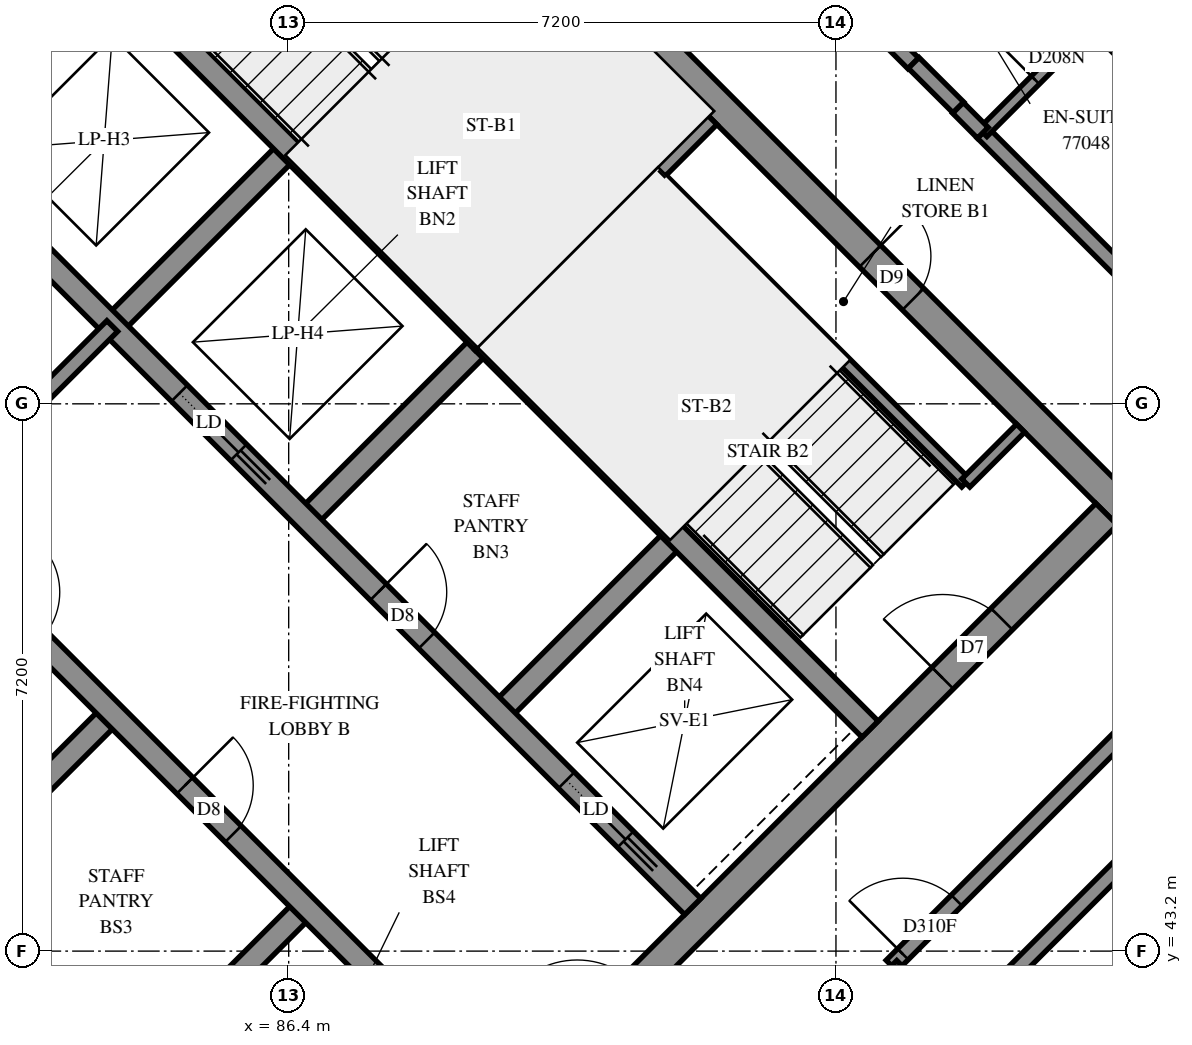
"""IFC4 building model, lengths in metres.
Left out: names, types, materials, properties, quantities, classifications, styles, units other than length and angle.
Written with IfcOpenShell. Run it as: python <this file> out.ifc"""

import sys

from ifc_helpers import new_model, si_unit, direction, frame, frame_2d, origin, place, context, subcontext, project, spatial, polyline, rectangle, outline, extrude, element, fill, save


model = new_model("IFC4")
c1 = context("Model", 3, precision=1e-05, world=origin(), true_north=direction((0.0, 1.0)))
c2 = subcontext(c1, "Body", "Model", "MODEL_VIEW")
j1 = project(units=[si_unit("LENGTHUNIT", "METRE"), si_unit("PLANEANGLEUNIT", "RADIAN")], contexts=[c1])
p1 = place(None, origin())
s1 = spatial("IfcSite", under=j1, at=p1, CompositionType="ELEMENT")
p2 = place(p1, origin())
s2 = spatial("IfcBuilding", under=s1, at=p2, CompositionType="ELEMENT")
p3 = place(p2, frame((0.0, 0.0, 281.2)))
s3 = spatial("IfcBuildingStorey", under=s2, at=p3, CompositionType="ELEMENT", Elevation=281.2)
p4 = place(p3, frame((76.23, 49.231, -0.3), z_axis=(0.0, 0.0, 1.0), x_axis=(0.7071034917, -0.7071100706, 0.0)))
e1 = element("IfcWall", 1, at=p4, inside=s3, PredefinedType="SHEAR", context=c2, shape_type="SweptSolid", body=[
    extrude(rectangle(XDim=15.2, YDim=0.4, at=frame_2d((7.6, 0.0))), origin(), (0.0, 0.0, 1.0), 2.7),
])
p5 = place(p3, frame((86.695, 59.696, -0.3), z_axis=(0.0, 0.0, 1.0), x_axis=(0.7071100706, -0.7071034917, 0.0)))
e2 = element("IfcWall", 2, at=p5, inside=s3, PredefinedType="SHEAR", context=c2, shape_type="SweptSolid", body=[
    extrude(rectangle(XDim=15.2, YDim=0.4, at=frame_2d((7.6, 0.0))), origin(), (0.0, 0.0, 1.0), 2.7),
])
p6 = place(p5, frame((10.4, 0.0, 0.3)))
e3 = element("IfcOpeningElement", 3, at=p6, cuts=e2, PredefinedType="OPENING", context=c2, shape_type="SweptSolid", body=[
    extrude(rectangle(XDim=0.8, YDim=2.1, at=frame_2d((0.4, 1.05))), frame((0.0, 0.21, 0.0), z_axis=(0.0, -1.0, 0.0), x_axis=(1.0, 0.0, 0.0)), (0.0, 0.0, 1.0), 0.42),
])
p7 = place(p3, frame((76.513, 49.231, -0.3), z_axis=(0.0, 0.0, 1.0), x_axis=(0.7071067812, 0.7071067812, 0.0)))
e4 = element("IfcWall", 4, at=p7, inside=s3, PredefinedType="SHEAR", context=c2, shape_type="SweptSolid", body=[
    extrude(rectangle(XDim=14.4, YDim=0.4, at=frame_2d((7.2, 0.0))), origin(), (0.0, 0.0, 1.0), 2.7),
])
p8 = place(p7, frame((4.55, 0.0, 0.3)))
e5 = element("IfcOpeningElement", 5, at=p8, cuts=e4, PredefinedType="OPENING", context=c2, shape_type="SweptSolid", body=[
    extrude(rectangle(XDim=1.1, YDim=2.1, at=frame_2d((0.55, 1.05))), frame((0.0, 0.21, 0.0), z_axis=(0.0, -1.0, 0.0), x_axis=(1.0, 0.0, 0.0)), (0.0, 0.0, 1.0), 0.42),
])
p9 = place(p7, frame((11.35, 0.0, 0.3)))
e6 = element("IfcOpeningElement", 6, at=p9, cuts=e4, PredefinedType="OPENING", context=c2, shape_type="SweptSolid", body=[
    extrude(rectangle(XDim=1.1, YDim=2.1, at=frame_2d((0.55, 1.05))), frame((0.0, 0.21, 0.0), z_axis=(0.0, -1.0, 0.0), x_axis=(1.0, 0.0, 0.0)), (0.0, 0.0, 1.0), 0.42),
])
p10 = place(p3, frame((86.978, 38.766, -0.3), z_axis=(0.0, 0.0, 1.0), x_axis=(0.7071067812, 0.7071067812, 0.0)))
e7 = element("IfcWall", 7, at=p10, inside=s3, PredefinedType="SHEAR", context=c2, shape_type="SweptSolid", body=[
    extrude(rectangle(XDim=14.4, YDim=0.4, at=frame_2d((7.2, 0.0))), origin(), (0.0, 0.0, 1.0), 2.7),
])
p11 = place(p10, frame((4.55, 0.0, 0.3)))
e8 = element("IfcOpeningElement", 8, at=p11, cuts=e7, PredefinedType="OPENING", context=c2, shape_type="SweptSolid", body=[
    extrude(rectangle(XDim=1.1, YDim=2.1, at=frame_2d((0.55, 1.05))), frame((0.0, 0.21, 0.0), z_axis=(0.0, -1.0, 0.0), x_axis=(1.0, 0.0, 0.0)), (0.0, 0.0, 1.0), 0.42),
])
p12 = place(p10, frame((11.35, 0.0, 0.3)))
e9 = element("IfcOpeningElement", 9, at=p12, cuts=e7, PredefinedType="OPENING", context=c2, shape_type="SweptSolid", body=[
    extrude(rectangle(XDim=1.1, YDim=2.1, at=frame_2d((0.55, 1.05))), frame((0.0, 0.21, 0.0), z_axis=(0.0, -1.0, 0.0), x_axis=(1.0, 0.0, 0.0)), (0.0, 0.0, 1.0), 0.42),
])
p13 = place(p3, frame((84.079, 51.423, 0.0), z_axis=(0.0, 0.0, 1.0), x_axis=(0.7071219326, 0.7070916295, 0.0)))
e10 = element("IfcWall", 10, at=p13, inside=s3, PredefinedType="SOLIDWALL", context=c2, shape_type="SweptSolid", body=[
    extrude(rectangle(XDim=3.3, YDim=0.3, at=frame_2d((1.65, 0.0))), origin(), (0.0, 0.0, 1.0), 3.1),
])
p14 = place(p3, frame((81.746, 43.999, 0.0), z_axis=(0.0, 0.0, 1.0), x_axis=(0.7071067812, 0.7071067812, 0.0)))
e11 = element("IfcWall", 11, at=p14, inside=s3, PredefinedType="SOLIDWALL", context=c2, shape_type="SweptSolid", body=[
    extrude(rectangle(XDim=3.3, YDim=0.3, at=frame_2d((1.65, 0.0))), origin(), (0.0, 0.0, 1.0), 3.1),
])
p15 = place(p3, frame((86.625, 48.878, 0.0), z_axis=(0.0, 0.0, 1.0), x_axis=(0.7071067812, 0.7071067812, 0.0)))
e12 = element("IfcWall", 12, at=p15, inside=s3, PredefinedType="SOLIDWALL", context=c2, shape_type="SweptSolid", body=[
    extrude(rectangle(XDim=3.3, YDim=0.3, at=frame_2d((1.65, 0.0))), origin(), (0.0, 0.0, 1.0), 3.1),
])
p16 = place(p3, frame((84.291, 41.453, 0.0), z_axis=(0.0, 0.0, 1.0), x_axis=(0.7071067812, 0.7071067812, 0.0)))
e13 = element("IfcWall", 13, at=p16, inside=s3, PredefinedType="SOLIDWALL", context=c2, shape_type="SweptSolid", body=[
    extrude(rectangle(XDim=3.3, YDim=0.3, at=frame_2d((1.65, 0.0))), origin(), (0.0, 0.0, 1.0), 3.1),
])
p17 = place(p3, frame((89.17, 46.332, 0.0), z_axis=(0.0, 0.0, 1.0), x_axis=(0.7071067812, 0.7071067812, 0.0)))
e14 = element("IfcWall", 14, at=p17, inside=s3, PredefinedType="SOLIDWALL", context=c2, shape_type="SweptSolid", body=[
    extrude(rectangle(XDim=3.3, YDim=0.3, at=frame_2d((1.65, 0.0))), origin(), (0.0, 0.0, 1.0), 3.1),
])
p18 = place(p3, frame((78.988, 51.423, 0.0), z_axis=(0.0, 0.0, 1.0), x_axis=(0.7071067812, -0.7071067812, 0.0)))
e15 = element("IfcWall", 15, at=p18, inside=s3, PredefinedType="SOLIDWALL", context=c2, shape_type="SweptSolid", body=[
    extrude(rectangle(XDim=14.4, YDim=0.3, at=frame_2d((7.2, 0.0))), origin(), (0.0, 0.0, 1.0), 3.1),
])
p19 = place(p18, frame((1.35, 0.0, 0.0)))
e16 = element("IfcOpeningElement", 16, at=p19, cuts=e15, PredefinedType="OPENING", context=c2, shape_type="SweptSolid", body=[
    extrude(rectangle(XDim=0.9, YDim=2.1, at=frame_2d((0.45, 1.05))), frame((0.0, 0.16, 0.0), z_axis=(0.0, -1.0, 0.0), x_axis=(1.0, 0.0, 0.0)), (0.0, 0.0, 1.0), 0.32),
])
p20 = place(p18, frame((4.95, 0.0, 0.0)))
e17 = element("IfcOpeningElement", 17, at=p20, cuts=e15, PredefinedType="OPENING", context=c2, shape_type="SweptSolid", body=[
    extrude(rectangle(XDim=0.9, YDim=2.1, at=frame_2d((0.45, 1.05))), frame((0.0, 0.16, 0.0), z_axis=(0.0, -1.0, 0.0), x_axis=(1.0, 0.0, 0.0)), (0.0, 0.0, 1.0), 0.32),
])
p21 = place(p18, frame((8.55, 0.0, 0.0)))
e18 = element("IfcOpeningElement", 18, at=p21, cuts=e15, PredefinedType="OPENING", context=c2, shape_type="SweptSolid", body=[
    extrude(rectangle(XDim=0.9, YDim=2.1, at=frame_2d((0.45, 1.05))), frame((0.0, 0.16, 0.0), z_axis=(0.0, -1.0, 0.0), x_axis=(1.0, 0.0, 0.0)), (0.0, 0.0, 1.0), 0.32),
])
p22 = place(p18, frame((12.05, 0.0, 0.0)))
e19 = element("IfcOpeningElement", 19, at=p22, cuts=e15, PredefinedType="OPENING", context=c2, shape_type="SweptSolid", body=[
    extrude(rectangle(XDim=1.1, YDim=2.1, at=frame_2d((0.55, 1.05))), frame((0.0, 0.16, 0.0), z_axis=(0.0, -1.0, 0.0), x_axis=(1.0, 0.0, 0.0)), (0.0, 0.0, 1.0), 0.32),
])
p23 = place(p3, frame((81.534, 53.969, 0.0), z_axis=(0.0, 0.0, 1.0), x_axis=(0.707103309, -0.7071102534, 0.0)))
e20 = element("IfcWall", 20, at=p23, inside=s3, PredefinedType="SOLIDWALL", context=c2, shape_type="SweptSolid", body=[
    extrude(rectangle(XDim=14.4, YDim=0.3, at=frame_2d((7.2, 0.0))), origin(), (0.0, 0.0, 1.0), 3.1),
])
p24 = place(p23, frame((8.55, 0.0, 0.0)))
e21 = element("IfcOpeningElement", 21, at=p24, cuts=e20, PredefinedType="OPENING", context=c2, shape_type="SweptSolid", body=[
    extrude(rectangle(XDim=0.9, YDim=2.1, at=frame_2d((0.45, 1.05))), frame((0.0, 0.16, 0.0), z_axis=(0.0, -1.0, 0.0), x_axis=(1.0, 0.0, 0.0)), (0.0, 0.0, 1.0), 0.32),
])
p25 = place(p23, frame((1.25, 0.0, 0.0)))
e22 = element("IfcOpeningElement", 22, at=p25, cuts=e20, PredefinedType="OPENING", context=c2, shape_type="SweptSolid", body=[
    extrude(rectangle(XDim=1.1, YDim=2.1, at=frame_2d((0.55, 1.05))), frame((0.0, 0.16, 0.0), z_axis=(0.0, -1.0, 0.0), x_axis=(1.0, 0.0, 0.0)), (0.0, 0.0, 1.0), 0.32),
])
p26 = place(p23, frame((4.85, 0.0, 0.0)))
e23 = element("IfcOpeningElement", 23, at=p26, cuts=e20, PredefinedType="OPENING", context=c2, shape_type="SweptSolid", body=[
    extrude(rectangle(XDim=1.1, YDim=2.1, at=frame_2d((0.55, 1.05))), frame((0.0, 0.16, 0.0), z_axis=(0.0, -1.0, 0.0), x_axis=(1.0, 0.0, 0.0)), (0.0, 0.0, 1.0), 0.32),
])
p27 = place(p23, frame((12.05, 0.0, 0.0)))
e24 = element("IfcOpeningElement", 24, at=p27, cuts=e20, PredefinedType="OPENING", context=c2, shape_type="SweptSolid", body=[
    extrude(rectangle(XDim=1.1, YDim=2.1, at=frame_2d((0.55, 1.05))), frame((0.0, 0.16, 0.0), z_axis=(0.0, -1.0, 0.0), x_axis=(1.0, 0.0, 0.0)), (0.0, 0.0, 1.0), 0.32),
])
for number, where, z_axis, x_axis in (
    (25, (83.867, 56.302, 0.0), (0.0, 0.0, 1.0), (0.707, -0.707, 0.0)),
    (26, (88.958, 51.211, 0.0), (0.0, 0.0, 1.0), (0.707, -0.707, 0.0)),
):
    element("IfcWall", number, at=place(p3, frame(where, z_axis=z_axis, x_axis=x_axis)), inside=s3, PredefinedType="SOLIDWALL", context=c2, shape_type="SweptSolid", body=[
        extrude(rectangle(XDim=7.2, YDim=0.3, at=frame_2d((3.6, 0.0))), origin(), (0.0, 0.0, 1.0), 3.1),
    ])
p28 = place(p3, frame((88.958, 51.211, 0.0), z_axis=(0.0, 0.0, 1.0), x_axis=(0.7071067812, 0.7071067812, 0.0)))
e27 = element("IfcWall", 27, at=p28, inside=s3, PredefinedType="SOLIDWALL", context=c2, shape_type="SweptSolid", body=[
    extrude(rectangle(XDim=4.2, YDim=0.3, at=frame_2d((2.1, 0.0))), origin(), (0.0, 0.0, 1.0), 3.1),
])
p29 = place(p3, frame((100.466, 52.113, 0.0), z_axis=(0.0, 0.0, 1.0), x_axis=(-0.7071067812, 0.7071067812, 0.0)))
e28 = element("IfcWall", 28, at=p29, inside=s3, PredefinedType="SOLIDWALL", context=c2, shape_type="SweptSolid", body=[
    extrude(outline(polyline([(0.04, -0.225), (6.722, -0.225), (6.722, 0.225), (-0.04, 0.225), (0.04, -0.225)])), origin(), (0.0, 0.0, 1.0), 3.1),
])
p30 = place(p29, frame((0.649, 0.0, 0.45)))
e29 = element("IfcOpeningElement", 29, at=p30, cuts=e28, PredefinedType="OPENING", context=c2, shape_type="SweptSolid", body=[
    extrude(rectangle(XDim=2.8, YDim=2.55, at=frame_2d((1.4, 1.275))), frame((0.0, 0.235, 0.0), z_axis=(0.0, -1.0, 0.0), x_axis=(1.0, 0.0, 0.0)), (0.0, 0.0, 1.0), 0.47),
])
p31 = place(p29, frame((4.911, 0.0, 0.45)))
e30 = element("IfcOpeningElement", 30, at=p31, cuts=e28, PredefinedType="OPENING", context=c2, shape_type="SweptSolid", body=[
    extrude(rectangle(XDim=1.2, YDim=2.55, at=frame_2d((0.6, 1.275))), frame((0.0, 0.235, 0.0), z_axis=(0.0, -1.0, 0.0), x_axis=(1.0, 0.0, 0.0)), (0.0, 0.0, 1.0), 0.47),
])
p32 = place(p3, frame((91.313, 53.354, 0.0), z_axis=(0.0, 0.0, 1.0), x_axis=(0.7071067812, -0.7071067812, 0.0)))
e31 = element("IfcWall", 31, at=p32, inside=s3, PredefinedType="PARTITIONING", context=c2, shape_type="SweptSolid", body=[
    extrude(rectangle(XDim=5.65, YDim=0.15, at=frame_2d((2.825, 0.0))), origin(), (0.0, 0.0, 1.0), 3.1),
])
p33 = place(p3, frame((95.308, 49.358, 0.0), z_axis=(0.0, 0.0, 1.0), x_axis=(0.70705776, 0.707155799, 0.0)))
e32 = element("IfcWall", 32, at=p33, inside=s3, PredefinedType="PARTITIONING", context=c2, shape_type="SweptSolid", body=[
    extrude(rectangle(XDim=1.02, YDim=0.15, at=frame_2d((0.51, 0.0))), origin(), (0.0, 0.0, 1.0), 3.1),
])
p34 = place(p3, frame((81.534, 48.878, 0.0), z_axis=(0.0, 0.0, 1.0), x_axis=(0.707092892, 0.7071206701, 0.0)))
e33 = element("IfcWall", 33, at=p34, inside=s3, PredefinedType="PARTITIONING", context=c2, shape_type="SweptSolid", body=[
    extrude(rectangle(XDim=3.6, YDim=0.2, at=frame_2d((1.8, 0.0))), origin(), (0.0, 0.0, 1.0), 3.1),
])
p35 = place(p3, frame((94.331, 43.009, 0.0), z_axis=(0.0, 0.0, 1.0), x_axis=(0.7071067812, 0.7071067812, 0.0)))
e34 = element("IfcWall", 34, at=p35, inside=s3, PredefinedType="PARTITIONING", context=c2, shape_type="SweptSolid", body=[
    extrude(rectangle(XDim=8.601, YDim=0.2, at=frame_2d((4.301, 0.0))), origin(), (0.0, 0.0, 1.0), 3.1),
])
p36 = place(p35, frame((0.212, 0.0, 0.0)))
e35 = element("IfcOpeningElement", 35, at=p36, cuts=e34, PredefinedType="OPENING", context=c2, shape_type="SweptSolid", body=[
    extrude(rectangle(XDim=1.0, YDim=2.1, at=frame_2d((0.5, 1.05))), frame((0.0, 0.11, 0.0), z_axis=(0.0, -1.0, 0.0), x_axis=(1.0, 0.0, 0.0)), (0.0, 0.0, 1.0), 0.22),
])
p37 = place(p3, frame((95.179, 42.161, 0.0), z_axis=(0.0, 0.0, 1.0), x_axis=(0.707115476, 0.7070980863, 0.0)))
e36 = element("IfcWall", 36, at=p37, inside=s3, PredefinedType="PARTITIONING", context=c2, shape_type="SweptSolid", body=[
    extrude(rectangle(XDim=5.75, YDim=0.2, at=frame_2d((2.875, 0.0))), origin(), (0.0, 0.0, 1.0), 3.1),
])
p38 = place(p3, frame((91.077, 58.421, 0.0), z_axis=(0.0, 0.0, 1.0), x_axis=(0.7069869563, -0.7072265858, 0.0)))
e37 = element("IfcWall", 37, at=p38, inside=s3, PredefinedType="PARTITIONING", context=c2, shape_type="SweptSolid", body=[
    extrude(rectangle(XDim=5.008, YDim=0.2, at=frame_2d((2.504, 0.0))), origin(), (0.0, 0.0, 1.0), 3.1),
])
p39 = place(p38, frame((2.132, 0.0, 0.0)))
e38 = element("IfcOpeningElement", 38, at=p39, cuts=e37, PredefinedType="OPENING", context=c2, shape_type="SweptSolid", body=[
    extrude(rectangle(XDim=0.9, YDim=2.1, at=frame_2d((0.45, 1.05))), frame((0.0, 0.11, 0.0), z_axis=(0.0, -1.0, 0.0), x_axis=(1.0, 0.0, 0.0)), (0.0, 0.0, 1.0), 0.22),
])
p40 = place(p3, frame((95.531, 53.965, 0.0), z_axis=(0.0, 0.0, 1.0), x_axis=(0.7071067812, -0.7071067812, 0.0)))
e39 = element("IfcWall", 39, at=p40, inside=s3, PredefinedType="PARTITIONING", context=c2, shape_type="SweptSolid", body=[
    extrude(rectangle(XDim=4.899, YDim=0.2, at=frame_2d((2.449, 0.0))), origin(), (0.0, 0.0, 1.0), 3.1),
])
p41 = place(p40, frame((3.031, 0.0, 0.0)))
e40 = element("IfcOpeningElement", 40, at=p41, cuts=e39, PredefinedType="OPENING", context=c2, shape_type="SweptSolid", body=[
    extrude(rectangle(XDim=0.9, YDim=2.1, at=frame_2d((0.45, 1.05))), frame((0.0, 0.11, 0.0), z_axis=(0.0, -1.0, 0.0), x_axis=(1.0, 0.0, 0.0)), (0.0, 0.0, 1.0), 0.22),
])
p42 = place(p3, frame((94.329, 43.005, 0.0), z_axis=(0.0, 0.0, 1.0), x_axis=(0.7071067812, -0.7071067812, 0.0)))
e41 = element("IfcWall", 41, at=p42, inside=s3, PredefinedType="PARTITIONING", context=c2, shape_type="SweptSolid", body=[
    extrude(rectangle(XDim=4.8, YDim=0.2, at=frame_2d((2.4, 0.0))), origin(), (0.0, 0.0, 1.0), 3.1),
])
p43 = place(p42, frame((1.707, 0.0, 0.0)))
e42 = element("IfcOpeningElement", 42, at=p43, cuts=e41, PredefinedType="OPENING", context=c2, shape_type="SweptSolid", body=[
    extrude(rectangle(XDim=1.0, YDim=2.1, at=frame_2d((0.5, 1.05))), frame((0.0, 0.11, 0.0), z_axis=(0.0, -1.0, 0.0), x_axis=(1.0, 0.0, 0.0)), (0.0, 0.0, 1.0), 0.22),
])
p44 = place(p3, frame((95.533, 53.969, 0.0), z_axis=(0.0, 0.0, 1.0), x_axis=(0.7070811488, 0.7071324126, 0.0)))
e43 = element("IfcWall", 43, at=p44, inside=s3, PredefinedType="PARTITIONING", context=c2, shape_type="SweptSolid", body=[
    extrude(rectangle(XDim=1.951, YDim=0.15, at=frame_2d((0.975, 0.0))), origin(), (0.0, 0.0, 1.0), 3.1),
])
p45 = place(p44, frame((0.976, 0.0, 0.0)))
e44 = element("IfcOpeningElement", 44, at=p45, cuts=e43, PredefinedType="OPENING", context=c2, shape_type="SweptSolid", body=[
    extrude(rectangle(XDim=0.8, YDim=2.1, at=frame_2d((0.4, 1.05))), frame((0.0, 0.085, 0.0), z_axis=(0.0, -1.0, 0.0), x_axis=(1.0, 0.0, 0.0)), (0.0, 0.0, 1.0), 0.17),
])
p46 = place(p3, frame((94.623, 54.885, 0.0), z_axis=(0.0, 0.0, 1.0), x_axis=(0.7083103646, -0.7059011457, 0.0)))
e45 = element("IfcWall", 45, at=p46, inside=s3, PredefinedType="PARTITIONING", context=c2, shape_type="SweptSolid", body=[
    extrude(rectangle(XDim=0.83, YDim=0.2, at=frame_2d((0.415, 0.0))), origin(), (0.0, 0.0, 1.0), 3.1),
])
p47 = place(p3, frame((95.206, 54.294, 0.0), z_axis=(0.0, 0.0, 1.0), x_axis=(0.7049410788, -0.7092658707, 0.0)))
e46 = element("IfcWall", 46, at=p47, inside=s3, PredefinedType="PARTITIONING", context=c2, shape_type="SweptSolid", body=[
    extrude(rectangle(XDim=0.462, YDim=0.2, at=frame_2d((0.231, 0.0))), origin(), (0.0, 0.0, 1.0), 3.1),
])
p48 = place(p6, origin())
e47 = element("IfcDoor", 47, at=p48, inside=s3, OperationType="SINGLE_SWING_RIGHT", PredefinedType="DOOR", context=c2, shape_type="SweptSolid", body=[
    extrude(rectangle(XDim=0.8, YDim=2.1, at=frame_2d((0.4, 1.05))), frame((0.0, 0.025, 0.0), z_axis=(0.0, -1.0, 0.0), x_axis=(1.0, 0.0, 0.0)), (0.0, 0.0, 1.0), 0.05),
])
fill(e3, e47)
p49 = place(p12, origin())
e48 = element("IfcDoor", 48, at=p49, inside=s3, OperationType="SINGLE_SWING_RIGHT", PredefinedType="DOOR", context=c2, shape_type="SweptSolid", body=[
    extrude(rectangle(XDim=1.1, YDim=2.1, at=frame_2d((0.55, 1.05))), frame((0.0, 0.025, 0.0), z_axis=(0.0, -1.0, 0.0), x_axis=(1.0, 0.0, 0.0)), (0.0, 0.0, 1.0), 0.05),
])
fill(e9, e48)
p50 = place(p21, origin())
e49 = element("IfcDoor", 49, at=p50, inside=s3, OperationType="SINGLE_SWING_LEFT", PredefinedType="DOOR", context=c2, shape_type="SweptSolid", body=[
    extrude(rectangle(XDim=0.9, YDim=2.1, at=frame_2d((0.45, 1.05))), frame((0.0, 0.025, 0.0), z_axis=(0.0, -1.0, 0.0), x_axis=(1.0, 0.0, 0.0)), (0.0, 0.0, 1.0), 0.05),
])
fill(e18, e49)
p51 = place(p24, origin())
e50 = element("IfcDoor", 50, at=p51, inside=s3, OperationType="SINGLE_SWING_LEFT", PredefinedType="DOOR", context=c2, shape_type="SweptSolid", body=[
    extrude(rectangle(XDim=0.9, YDim=2.1, at=frame_2d((0.45, 1.05))), frame((0.0, 0.025, 0.0), z_axis=(0.0, -1.0, 0.0), x_axis=(1.0, 0.0, 0.0)), (0.0, 0.0, 1.0), 0.05),
])
fill(e21, e50)
p52 = place(p26, origin())
e51 = element("IfcDoor", 51, at=p52, inside=s3, OperationType="SLIDING_TO_RIGHT", PredefinedType="DOOR", context=c2, shape_type="SweptSolid", body=[
    extrude(rectangle(XDim=1.1, YDim=2.1, at=frame_2d((0.55, 1.05))), frame((0.0, 0.025, 0.0), z_axis=(0.0, -1.0, 0.0), x_axis=(1.0, 0.0, 0.0)), (0.0, 0.0, 1.0), 0.05),
])
fill(e23, e51)
p53 = place(p27, origin())
e52 = element("IfcDoor", 52, at=p53, inside=s3, OperationType="SLIDING_TO_RIGHT", PredefinedType="DOOR", context=c2, shape_type="SweptSolid", body=[
    extrude(rectangle(XDim=1.1, YDim=2.1, at=frame_2d((0.55, 1.05))), frame((0.0, 0.025, 0.0), z_axis=(0.0, -1.0, 0.0), x_axis=(1.0, 0.0, 0.0)), (0.0, 0.0, 1.0), 0.05),
])
fill(e24, e52)
p54 = place(p45, origin())
e53 = element("IfcDoor", 53, at=p54, inside=s3, OperationType="SINGLE_SWING_RIGHT", PredefinedType="DOOR", context=c2, shape_type="SweptSolid", body=[
    extrude(rectangle(XDim=0.8, YDim=2.1, at=frame_2d((0.4, 1.05))), frame((0.0, 0.025, 0.0), z_axis=(0.0, -1.0, 0.0), x_axis=(1.0, 0.0, 0.0)), (0.0, 0.0, 1.0), 0.05),
])
fill(e44, e53)
p55 = place(p36, origin())
e54 = element("IfcDoor", 54, at=p55, inside=s3, OperationType="SINGLE_SWING_LEFT", PredefinedType="DOOR", context=c2, shape_type="SweptSolid", body=[
    extrude(rectangle(XDim=1.0, YDim=2.1, at=frame_2d((0.5, 1.05))), frame((0.0, 0.025, 0.0), z_axis=(0.0, -1.0, 0.0), x_axis=(1.0, 0.0, 0.0)), (0.0, 0.0, 1.0), 0.05),
])
fill(e35, e54)
save(model, sys.argv[1])
